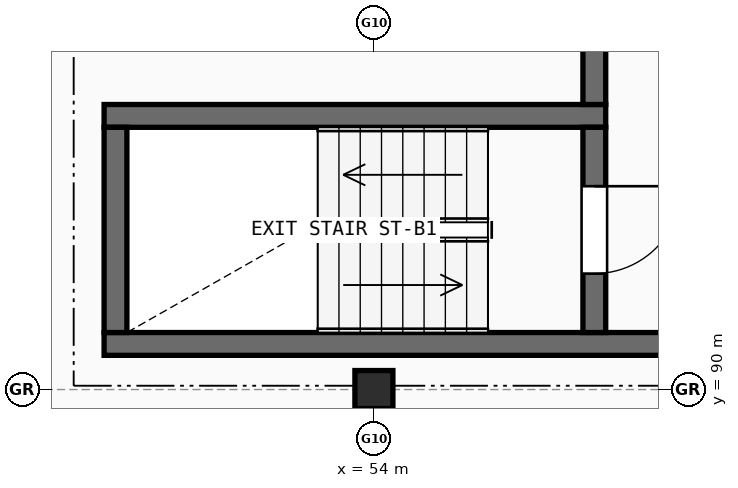
"""IFC4 building model, lengths in metres.
Left out: names, types, materials, properties, quantities, classifications, styles, units other than length and angle.
Written with IfcOpenShell. Run it as: python <this file> out.ifc"""

import sys

from ifc_helpers import new_model, si_unit, direction, frame, frame_2d, origin, origin_2d, place, context, subcontext, project, spatial, rectangle, extrude, element, fill, save


model = new_model("IFC4")
c1 = context("Model", 3, precision=1e-05, world=origin(), true_north=direction((0.0, 1.0)))
c2 = subcontext(c1, "Body", "Model", "MODEL_VIEW")
j1 = project(units=[si_unit("LENGTHUNIT", "METRE"), si_unit("PLANEANGLEUNIT", "RADIAN")], contexts=[c1])
p1 = place(None, origin())
s1 = spatial("IfcSite", under=j1, at=p1, CompositionType="ELEMENT")
p2 = place(p1, origin())
s2 = spatial("IfcBuilding", under=s1, at=p2, CompositionType="ELEMENT")
p3 = place(p2, frame((0.0, 0.0, 30.1)))
s3 = spatial("IfcBuildingStorey", under=s2, at=p3, CompositionType="ELEMENT", Elevation=30.1)
p4 = place(p3, frame((54.0, 90.0, 0.0), z_axis=(0.0, 0.0, 1.0), x_axis=(1.0, 0.0, 0.0)))
e1 = element("IfcColumn", 1, at=p4, inside=s3, PredefinedType="COLUMN", context=c2, shape_type="SweptSolid", body=[
    extrude(rectangle(XDim=0.5, YDim=0.5, at=origin_2d()), origin(), (0.0, 0.0, 1.0), 2.985),
])
p5 = place(p3, frame((50.45, 90.6, 0.0), z_axis=(0.0, 0.0, 1.0), x_axis=(1.0, 0.0, 0.0)))
e2 = element("IfcWall", 2, at=p5, inside=s3, PredefinedType="SHEAR", context=c2, shape_type="SweptSolid", body=[
    extrude(rectangle(XDim=11.35, YDim=0.3, at=frame_2d((5.675, 0.0))), origin(), (0.0, 0.0, 1.0), 2.985),
])
p6 = place(p5, frame((8.1, 0.0, 0.0)))
e3 = element("IfcOpeningElement", 3, at=p6, cuts=e2, PredefinedType="OPENING", context=c2, shape_type="SweptSolid", body=[
    extrude(rectangle(XDim=1.15, YDim=2.15, at=frame_2d((0.575, 1.075))), frame((0.0, 0.16, 0.0), z_axis=(0.0, -1.0, 0.0), x_axis=(1.0, 0.0, 0.0)), (0.0, 0.0, 1.0), 0.32),
])
p7 = place(p3, frame((57.05, 93.6, 0.0), z_axis=(0.0, 0.0, 1.0), x_axis=(-1.0, 0.0, 0.0)))
e4 = element("IfcWall", 4, at=p7, inside=s3, PredefinedType="SHEAR", context=c2, shape_type="SweptSolid", body=[
    extrude(rectangle(XDim=6.6, YDim=0.3, at=frame_2d((3.3, 0.0))), origin(), (0.0, 0.0, 1.0), 2.985),
])
p8 = place(p3, frame((50.6, 93.45, 0.0), z_axis=(0.0, 0.0, 1.0), x_axis=(0.0, -1.0, 0.0)))
e5 = element("IfcWall", 5, at=p8, inside=s3, PredefinedType="SHEAR", context=c2, shape_type="SweptSolid", body=[
    extrude(rectangle(XDim=2.7, YDim=0.3, at=frame_2d((1.35, 0.0))), origin(), (0.0, 0.0, 1.0), 2.985),
])
p9 = place(p3, frame((56.9, 90.75, 0.0), z_axis=(0.0, 0.0, 1.0), x_axis=(0.0, 1.0, 0.0)))
e6 = element("IfcWall", 6, at=p9, inside=s3, PredefinedType="SHEAR", context=c2, shape_type="SweptSolid", body=[
    extrude(rectangle(XDim=2.7, YDim=0.3, at=frame_2d((1.35, 0.0))), origin(), (0.0, 0.0, 1.0), 2.985),
])
p10 = place(p9, frame((0.775, 0.0, 0.0)))
e7 = element("IfcOpeningElement", 7, at=p10, cuts=e6, PredefinedType="OPENING", context=c2, shape_type="SweptSolid", body=[
    extrude(rectangle(XDim=1.15, YDim=2.15, at=frame_2d((0.575, 1.075))), frame((0.0, 0.16, 0.0), z_axis=(0.0, -1.0, 0.0), x_axis=(1.0, 0.0, 0.0)), (0.0, 0.0, 1.0), 0.32),
])
p11 = place(p3, frame((56.9, 93.75, 0.0), z_axis=(0.0, 0.0, 1.0), x_axis=(0.0, 1.0, 0.0)))
e8 = element("IfcWall", 8, at=p11, inside=s3, PredefinedType="SHEAR", context=c2, shape_type="SweptSolid", body=[
    extrude(rectangle(XDim=3.45, YDim=0.3, at=frame_2d((1.725, 0.0))), origin(), (0.0, 0.0, 1.0), 2.985),
])
p12 = place(p10, origin())
e9 = element("IfcDoor", 9, at=p12, inside=s3, OperationType="SINGLE_SWING_RIGHT", PredefinedType="DOOR", context=c2, shape_type="SweptSolid", body=[
    extrude(rectangle(XDim=1.15, YDim=2.15, at=frame_2d((0.575, 1.075))), frame((0.0, 0.025, 0.0), z_axis=(0.0, -1.0, 0.0), x_axis=(1.0, 0.0, 0.0)), (0.0, 0.0, 1.0), 0.05),
])
fill(e7, e9)
save(model, sys.argv[1])
